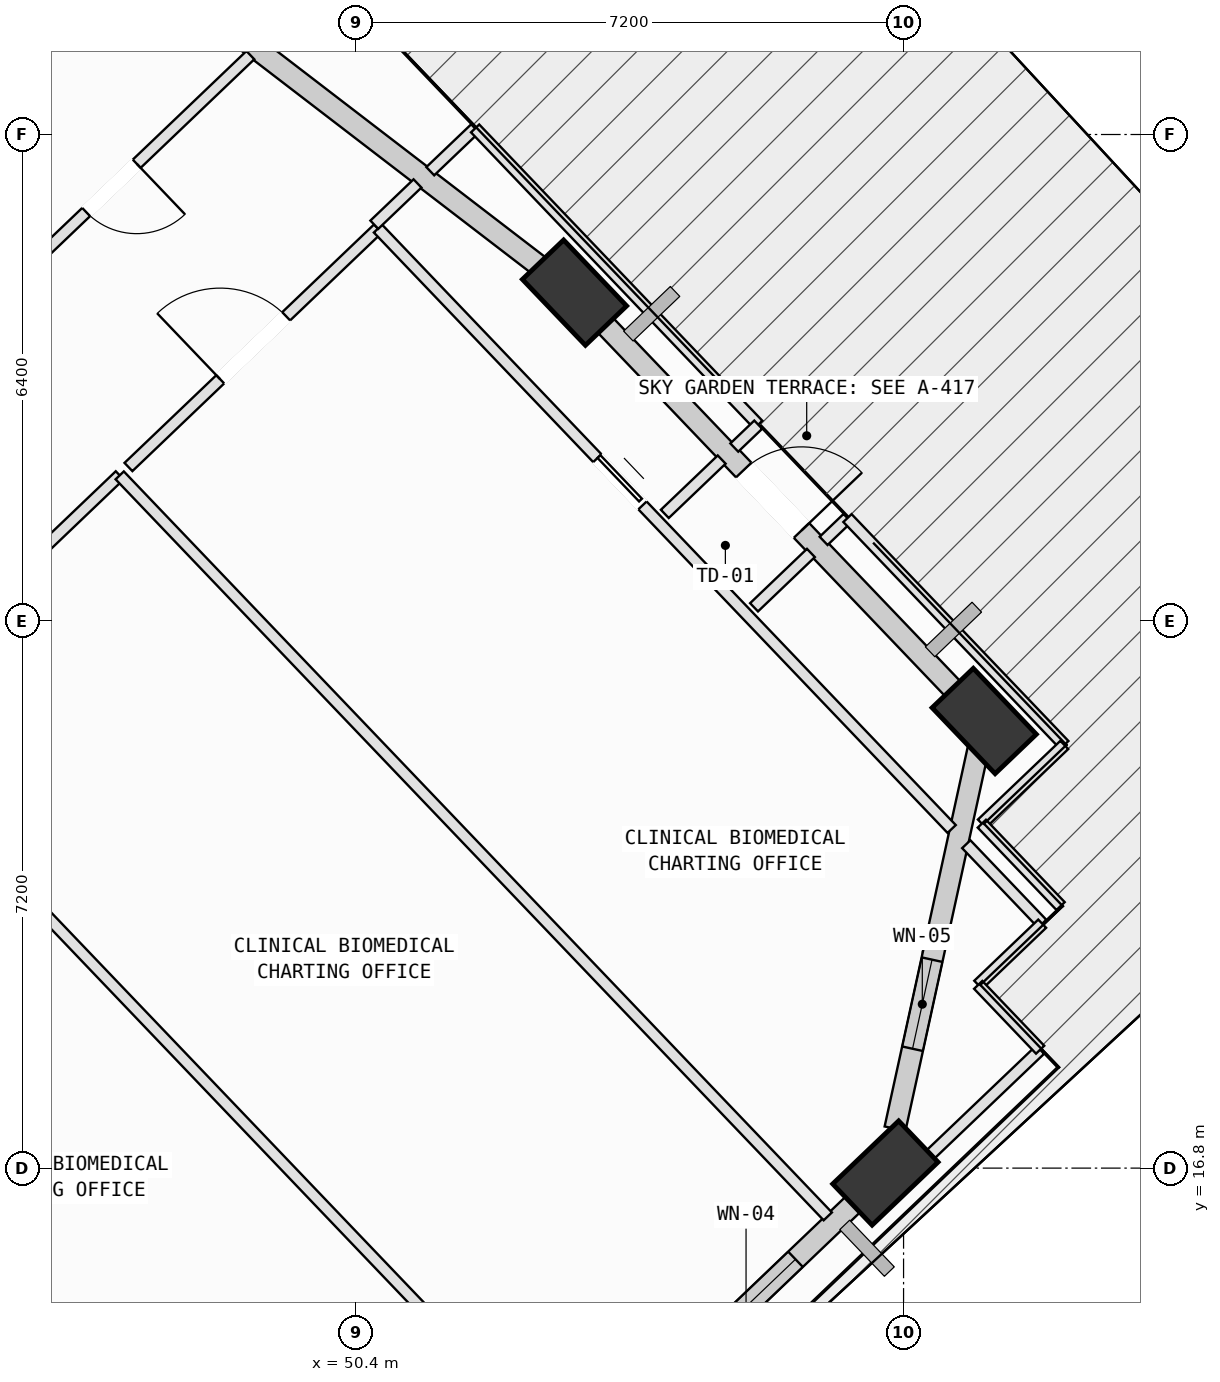
"""IFC4 building model, lengths in metres.
Left out: names, types, materials, properties, quantities, classifications, styles, units other than length and angle.
Written with IfcOpenShell. Run it as: python <this file> out.ifc"""

import sys

from ifc_helpers import new_model, si_unit, direction, frame, frame_2d, origin, origin_2d, place, context, subcontext, project, spatial, rectangle, extrude, element, fill, save


model = new_model("IFC4")
c1 = context("Model", 3, precision=1e-05, world=origin(), true_north=direction((0.0, 1.0)))
c2 = subcontext(c1, "Body", "Model", "MODEL_VIEW")
j1 = project(units=[si_unit("LENGTHUNIT", "METRE"), si_unit("PLANEANGLEUNIT", "RADIAN")], contexts=[c1])
p1 = place(None, origin())
s1 = spatial("IfcSite", under=j1, at=p1, CompositionType="ELEMENT")
p2 = place(p1, origin())
s2 = spatial("IfcBuilding", under=s1, at=p2, CompositionType="ELEMENT")
p3 = place(p2, frame((0.0, 0.0, 211.2)))
s3 = spatial("IfcBuildingStorey", under=s2, at=p3, CompositionType="ELEMENT", Elevation=211.2)
p4 = place(p3, frame((57.361, 16.735, 0.073), z_axis=(0.032482055305, 0.098250483475, 0.994631468726), x_axis=(-0.902127024393, -0.425506275001, 0.071492949273)))
e1 = element("IfcColumn", 1, at=p4, inside=s3, PredefinedType="COLUMN", context=c2, shape_type="SweptSolid", body=[
    extrude(rectangle(XDim=1.2, YDim=0.75, at=origin_2d()), origin(), (0.0, 0.0, 1.0), 3.946),
])
p5 = place(p3, frame((58.661, 22.683, 0.074), z_axis=(0.007921264253, 0.103347744549, 0.994613742751), x_axis=(0.633908539185, -0.769769143243, 0.074936173233)))
e2 = element("IfcColumn", 2, at=p5, inside=s3, PredefinedType="COLUMN", context=c2, shape_type="SweptSolid", body=[
    extrude(rectangle(XDim=1.2, YDim=0.75, at=origin_2d()), origin(), (0.0, 0.0, 1.0), 3.945),
])
p6 = place(p3, frame((53.271, 28.319, 0.06), z_axis=(-0.015197179354, 0.081113400375, 0.996589013596), x_axis=(0.811749063081, -0.580950790477, 0.059662698823)))
e3 = element("IfcColumn", 3, at=p6, inside=s3, PredefinedType="COLUMN", context=c2, shape_type="SweptSolid", body=[
    extrude(rectangle(XDim=1.2, YDim=0.75, at=origin_2d()), origin(), (0.0, 0.0, 1.0), 3.952),
])
p7 = place(p3, frame((57.213, 16.589, 0.0), z_axis=(0.0, 0.0, 1.0), x_axis=(-0.722958179975, -0.69089179327, 0.0)))
e4 = element("IfcWall", 4, at=p7, inside=s3, PredefinedType="SOLIDWALL", context=c2, shape_type="SweptSolid", body=[
    extrude(rectangle(XDim=6.418, YDim=0.28, at=frame_2d((3.209, 0.0))), origin(), (0.0, 0.0, 1.0), 3.265),
])
p8 = place(p7, frame((1.431, 0.0, 0.75)))
e5 = element("IfcOpeningElement", 5, at=p8, cuts=e4, PredefinedType="OPENING", context=c2, shape_type="SweptSolid", body=[
    extrude(rectangle(XDim=1.8, YDim=2.05, at=frame_2d((0.9, 1.025))), frame((0.0, 0.15, 0.0), z_axis=(0.0, -1.0, 0.0), x_axis=(1.0, 0.0, 0.0)), (0.0, 0.0, 1.0), 0.3),
])
p9 = place(p3, frame((58.62, 22.49, 0.0), z_axis=(0.0, 0.0, 1.0), x_axis=(-0.213848166645, -0.976866910906, 0.0)))
e6 = element("IfcWall", 6, at=p9, inside=s3, PredefinedType="SOLIDWALL", context=c2, shape_type="SweptSolid", body=[
    extrude(rectangle(XDim=5.294, YDim=0.28, at=frame_2d((2.647, 0.0))), origin(), (0.0, 0.0, 1.0), 3.265),
])
p10 = place(p9, frame((3.017, 0.0, 0.75)))
e7 = element("IfcOpeningElement", 7, at=p10, cuts=e6, PredefinedType="OPENING", context=c2, shape_type="SweptSolid", body=[
    extrude(rectangle(XDim=1.2, YDim=1.75, at=frame_2d((0.6, 0.875))), frame((0.0, 0.15, 0.0), z_axis=(0.0, -1.0, 0.0), x_axis=(1.0, 0.0, 0.0)), (0.0, 0.0, 1.0), 0.3),
])
p11 = place(p3, frame((53.443, 28.135, 0.0), z_axis=(0.0, 0.0, 1.0), x_axis=(0.690865418221, -0.722983384253, 0.0)))
e8 = element("IfcWall", 8, at=p11, inside=s3, PredefinedType="SOLIDWALL", context=c2, shape_type="SweptSolid", body=[
    extrude(rectangle(XDim=7.046, YDim=0.28, at=frame_2d((3.523, 0.0))), origin(), (0.0, 0.0, 1.0), 3.265),
])
p12 = place(p11, frame((2.973, 0.0, 0.0)))
e9 = element("IfcOpeningElement", 9, at=p12, cuts=e8, PredefinedType="OPENING", context=c2, shape_type="SweptSolid", body=[
    extrude(rectangle(XDim=1.1, YDim=2.15, at=frame_2d((0.55, 1.075))), frame((0.0, 0.15, 0.0), z_axis=(0.0, -1.0, 0.0), x_axis=(1.0, 0.0, 0.0)), (0.0, 0.0, 1.0), 0.3),
])
p13 = place(p3, frame((45.703, 34.124, 0.0), z_axis=(0.0, 0.0, 1.0), x_axis=(0.793258339764, -0.608885216108, 0.0)))
e10 = element("IfcWall", 10, at=p13, inside=s3, PredefinedType="SOLIDWALL", context=c2, shape_type="SweptSolid", body=[
    extrude(rectangle(XDim=9.036, YDim=0.28, at=frame_2d((4.518, 0.0))), origin(), (0.0, 0.0, 1.0), 3.265),
])
p14 = place(p13, frame((1.479, 0.0, 0.75)))
e11 = element("IfcOpeningElement", 11, at=p14, cuts=e10, PredefinedType="OPENING", context=c2, shape_type="SweptSolid", body=[
    extrude(rectangle(XDim=2.0, YDim=1.95, at=frame_2d((1.0, 0.975))), frame((0.0, 0.15, 0.0), z_axis=(0.0, -1.0, 0.0), x_axis=(1.0, 0.0, 0.0)), (0.0, 0.0, 1.0), 0.3),
])
p15 = place(p3, frame((37.093, 16.173, 0.0), z_axis=(0.0, 0.0, 1.0), x_axis=(0.690902774349, -0.722947685795, 0.0)))
e12 = element("IfcWall", 12, at=p15, inside=s3, PredefinedType="PARTITIONING", context=c2, shape_type="SweptSolid", body=[
    extrude(rectangle(XDim=13.485, YDim=0.15, at=frame_2d((6.743, 0.0))), origin(), (0.0, 0.0, 1.0), 3.78),
])
p16 = place(p15, frame((6.312, 0.0, 0.0)))
e13 = element("IfcOpeningElement", 13, at=p16, cuts=e12, PredefinedType="OPENING", context=c2, shape_type="SweptSolid", body=[
    extrude(rectangle(XDim=0.86, YDim=2.06, at=frame_2d((0.43, 1.03))), frame((0.0, 0.085, 0.0), z_axis=(0.0, -1.0, 0.0), x_axis=(1.0, 0.0, 0.0)), (0.0, 0.0, 1.0), 0.17),
])
p17 = place(p3, frame((41.23, 18.647, 0.0), z_axis=(0.0, 0.0, 1.0), x_axis=(0.690901109008, -0.722949277316, 0.0)))
e14 = element("IfcWall", 14, at=p17, inside=s3, PredefinedType="PARTITIONING", context=c2, shape_type="SweptSolid", body=[
    extrude(rectangle(XDim=12.76, YDim=0.15, at=frame_2d((6.38, 0.0))), origin(), (0.0, 0.0, 1.0), 3.78),
])
p18 = place(p3, frame((43.889, 22.667, 0.0), z_axis=(0.0, 0.0, 1.0), x_axis=(0.690910559681, -0.722940245471, 0.0)))
e15 = element("IfcWall", 15, at=p18, inside=s3, PredefinedType="PARTITIONING", context=c2, shape_type="SweptSolid", body=[
    extrude(rectangle(XDim=13.484, YDim=0.15, at=frame_2d((6.742, 0.0))), origin(), (0.0, 0.0, 1.0), 3.415),
])
p19 = place(p3, frame((44.004, 22.778, 0.0), z_axis=(0.0, 0.0, 1.0), x_axis=(0.723025899483, 0.69082092374, 0.0)))
e16 = element("IfcWall", 16, at=p19, inside=s3, PredefinedType="PARTITIONING", context=c2, shape_type="SweptSolid", body=[
    extrude(rectangle(XDim=4.541, YDim=0.15, at=frame_2d((2.271, 0.0))), origin(), (0.0, 0.0, 1.0), 2.765),
])
p20 = place(p19, frame((1.67, 0.0, 0.0)))
e17 = element("IfcOpeningElement", 17, at=p20, cuts=e16, PredefinedType="OPENING", context=c2, shape_type="SweptSolid", body=[
    extrude(rectangle(XDim=1.2, YDim=2.15, at=frame_2d((0.6, 1.075))), frame((0.0, 0.085, 0.0), z_axis=(0.0, -1.0, 0.0), x_axis=(1.0, 0.0, 0.0)), (0.0, 0.0, 1.0), 0.17),
])
p21 = place(p3, frame((47.287, 25.915, 0.0), z_axis=(0.0, 0.0, 1.0), x_axis=(0.690828749695, -0.72301842203, 0.0)))
e18 = element("IfcWall", 18, at=p21, inside=s3, PredefinedType="PARTITIONING", context=c2, shape_type="SweptSolid", body=[
    extrude(rectangle(XDim=13.485, YDim=0.15, at=frame_2d((6.743, 0.0))), origin(), (0.0, 0.0, 1.0), 3.78),
])
p22 = place(p3, frame((59.397, 18.358, 0.0), z_axis=(0.0, 0.0, 1.0), x_axis=(-0.723173492575, -0.690666417047, 0.0)))
e19 = element("IfcWall", 19, at=p22, inside=s3, PredefinedType="PARTITIONING", context=c2, shape_type="SweptSolid", body=[
    extrude(rectangle(XDim=2.801, YDim=0.15, at=frame_2d((1.401, 0.0))), origin(), (0.0, 0.0, 1.0), 3.265),
])
p23 = place(p3, frame((47.402, 26.025, 0.0), z_axis=(0.0, 0.0, 1.0), x_axis=(0.722973384646, 0.690875882553, 0.0)))
e20 = element("IfcWall", 20, at=p23, inside=s3, PredefinedType="PARTITIONING", context=c2, shape_type="SweptSolid", body=[
    extrude(rectangle(XDim=4.541, YDim=0.15, at=frame_2d((2.271, 0.0))), origin(), (0.0, 0.0, 1.0), 3.78),
])
p24 = place(p23, frame((1.67, 0.0, 0.0)))
e21 = element("IfcOpeningElement", 21, at=p24, cuts=e20, PredefinedType="OPENING", context=c2, shape_type="SweptSolid", body=[
    extrude(rectangle(XDim=1.2, YDim=2.15, at=frame_2d((0.6, 1.075))), frame((0.0, 0.085, 0.0), z_axis=(0.0, -1.0, 0.0), x_axis=(1.0, 0.0, 0.0)), (0.0, 0.0, 1.0), 0.17),
])
p25 = place(p3, frame((50.685, 29.162, 0.0), z_axis=(0.0, 0.0, 1.0), x_axis=(0.690801446866, -0.723044508317, 0.0)))
e22 = element("IfcWall", 22, at=p25, inside=s3, PredefinedType="PARTITIONING", context=c2, shape_type="SweptSolid", body=[
    extrude(rectangle(XDim=10.926, YDim=0.15, at=frame_2d((5.463, 0.0))), origin(), (0.0, 0.0, 1.0), 3.78),
])
p26 = place(p25, frame((4.177, 0.0, 0.0)))
e23 = element("IfcOpeningElement", 23, at=p26, cuts=e22, PredefinedType="OPENING", context=c2, shape_type="SweptSolid", body=[
    extrude(rectangle(XDim=0.86, YDim=2.06, at=frame_2d((0.43, 1.03))), frame((0.0, 0.085, 0.0), z_axis=(0.0, -1.0, 0.0), x_axis=(1.0, 0.0, 0.0)), (0.0, 0.0, 1.0), 0.17),
])
p27 = place(p3, frame((58.425, 21.062, 0.0), z_axis=(0.0, 0.0, 1.0), x_axis=(0.690716586023, -0.723125575397, 0.0)))
e24 = element("IfcWall", 24, at=p27, inside=s3, PredefinedType="PARTITIONING", context=c2, shape_type="SweptSolid", body=[
    extrude(rectangle(XDim=1.446, YDim=0.15, at=frame_2d((0.723, 0.0))), origin(), (0.0, 0.0, 1.0), 3.78),
])
p28 = place(p3, frame((59.424, 20.016, 0.0), z_axis=(0.0, 0.0, 1.0), x_axis=(-0.722751072616, -0.691108448098, 0.0)))
e25 = element("IfcWall", 25, at=p28, inside=s3, PredefinedType="PARTITIONING", context=c2, shape_type="SweptSolid", body=[
    extrude(rectangle(XDim=1.165, YDim=0.15, at=frame_2d((0.583, 0.0))), origin(), (0.0, 0.0, 1.0), 3.78),
])
p29 = place(p3, frame((58.582, 19.211, 0.0), z_axis=(0.0, 0.0, 1.0), x_axis=(0.690780844527, -0.723064191365, 0.0)))
e26 = element("IfcWall", 26, at=p29, inside=s3, PredefinedType="PARTITIONING", context=c2, shape_type="SweptSolid", body=[
    extrude(rectangle(XDim=1.18, YDim=0.15, at=frame_2d((0.59, 0.0))), origin(), (0.0, 0.0, 1.0), 3.78),
])
p30 = place(p3, frame((49.006, 31.444, 0.0), z_axis=(0.0, 0.0, 1.0), x_axis=(-0.723025524687, -0.690821316008, 0.0)))
e27 = element("IfcWall", 27, at=p30, inside=s3, PredefinedType="PARTITIONING", context=c2, shape_type="SweptSolid", body=[
    extrude(rectangle(XDim=5.057, YDim=0.15, at=frame_2d((2.528, 0.0))), origin(), (0.0, 0.0, 1.0), 3.78),
])
p31 = place(p30, frame((2.068, 0.0, 0.0)))
e28 = element("IfcOpeningElement", 28, at=p31, cuts=e27, PredefinedType="OPENING", context=c2, shape_type="SweptSolid", body=[
    extrude(rectangle(XDim=0.92, YDim=2.1, at=frame_2d((0.46, 1.05))), frame((0.0, 0.085, 0.0), z_axis=(0.0, -1.0, 0.0), x_axis=(1.0, 0.0, 0.0)), (0.0, 0.0, 1.0), 0.17),
])
p32 = place(p3, frame((50.637, 29.213, 0.0), z_axis=(0.0, 0.0, 1.0), x_axis=(0.722770010061, 0.691088643053, 0.0)))
e29 = element("IfcWall", 29, at=p32, inside=s3, PredefinedType="PARTITIONING", context=c2, shape_type="SweptSolid", body=[
    extrude(rectangle(XDim=0.786, YDim=0.15, at=frame_2d((0.393, 0.0))), origin(), (0.0, 0.0, 1.0), 3.78),
])
p33 = place(p3, frame((51.373, 29.917, 0.0), z_axis=(0.0, 0.0, 1.0), x_axis=(0.723382733555, 0.690447261414, 0.0)))
e30 = element("IfcWall", 30, at=p33, inside=s3, PredefinedType="PARTITIONING", context=c2, shape_type="SweptSolid", body=[
    extrude(rectangle(XDim=0.815, YDim=0.15, at=frame_2d((0.408, 0.0))), origin(), (0.0, 0.0, 1.0), 3.78),
])
p34 = place(p3, frame((51.963, 30.48, 0.0), z_axis=(0.0, 0.0, 1.0), x_axis=(0.690895641029, -0.722954502862, 0.0)))
e31 = element("IfcWall", 31, at=p34, inside=s3, PredefinedType="PARTITIONING", context=c2, shape_type="SweptSolid", body=[
    extrude(rectangle(XDim=5.392, YDim=0.15, at=frame_2d((2.696, 0.0))), origin(), (0.0, 0.0, 1.0), 3.265),
])
p35 = place(p3, frame((55.688, 26.582, 0.0), z_axis=(0.0, 0.0, 1.0), x_axis=(-0.7228973834, -0.690955405994, 0.0)))
e32 = element("IfcWall", 32, at=p35, inside=s3, PredefinedType="PARTITIONING", context=c2, shape_type="SweptSolid", body=[
    extrude(rectangle(XDim=0.436, YDim=0.15, at=frame_2d((0.218, 0.0))), origin(), (0.0, 0.0, 1.0), 3.78),
])
for number, where, z_axis, x_axis in (
    (33, (55.207, 26.123, 0.0), (0.0, 0.0, 1.0), (-0.723, -0.691, 0.0)),
    (34, (55.633, 24.179, 0.0), (0.0, 0.0, 1.0), (0.723, 0.691, 0.0)),
):
    element("IfcWall", number, at=place(p3, frame(where, z_axis=z_axis, x_axis=x_axis)), inside=s3, PredefinedType="PARTITIONING", context=c2, shape_type="SweptSolid", body=[
        extrude(rectangle(XDim=1.035, YDim=0.15, at=frame_2d((0.518, 0.0))), origin(), (0.0, 0.0, 1.0), 3.78),
    ])
p36 = place(p3, frame((56.548, 25.053, 0.0), z_axis=(0.0, 0.0, 1.0), x_axis=(0.722947010739, 0.690903480714, 0.0)))
e35 = element("IfcWall", 35, at=p36, inside=s3, PredefinedType="PARTITIONING", context=c2, shape_type="SweptSolid", body=[
    extrude(rectangle(XDim=0.434, YDim=0.15, at=frame_2d((0.217, 0.0))), origin(), (0.0, 0.0, 1.0), 3.78),
])
p37 = place(p3, frame((56.862, 25.353, 0.0), z_axis=(0.0, 0.0, 1.0), x_axis=(0.690932627738, -0.722919154489, 0.0)))
e36 = element("IfcWall", 36, at=p37, inside=s3, PredefinedType="PARTITIONING", context=c2, shape_type="SweptSolid", body=[
    extrude(rectangle(XDim=4.129, YDim=0.15, at=frame_2d((2.064, 0.0))), origin(), (0.0, 0.0, 1.0), 3.265),
])
p38 = place(p3, frame((59.715, 22.368, 0.0), z_axis=(0.0, 0.0, 1.0), x_axis=(-0.723351849636, -0.690479617099, 0.0)))
e37 = element("IfcWall", 37, at=p38, inside=s3, PredefinedType="PARTITIONING", context=c2, shape_type="SweptSolid", body=[
    extrude(rectangle(XDim=1.5, YDim=0.15, at=frame_2d((0.75, 0.0))), origin(), (0.0, 0.0, 1.0), 3.78),
])
p39 = place(p3, frame((58.63, 21.332, 0.0), z_axis=(0.0, 0.0, 1.0), x_axis=(0.690971235046, -0.722882253441, 0.0)))
e38 = element("IfcWall", 38, at=p39, inside=s3, PredefinedType="PARTITIONING", context=c2, shape_type="SweptSolid", body=[
    extrude(rectangle(XDim=1.5, YDim=0.15, at=frame_2d((0.75, 0.0))), origin(), (0.0, 0.0, 1.0), 3.78),
])
p40 = place(p12, origin())
e39 = element("IfcDoor", 39, at=p40, inside=s3, OperationType="SINGLE_SWING_RIGHT", PredefinedType="DOOR", context=c2, shape_type="SweptSolid", body=[
    extrude(rectangle(XDim=1.1, YDim=2.15, at=frame_2d((0.55, 1.075))), frame((0.0, 0.025, 0.0), z_axis=(0.0, -1.0, 0.0), x_axis=(1.0, 0.0, 0.0)), (0.0, 0.0, 1.0), 0.05),
])
fill(e9, e39)
p41 = place(p8, origin())
e40 = element("IfcWindow", 40, at=p41, inside=s3, PartitioningType="SINGLE_PANEL", PredefinedType="WINDOW", context=c2, shape_type="SweptSolid", body=[
    extrude(rectangle(XDim=1.8, YDim=2.05, at=frame_2d((0.9, 1.025))), frame((0.0, 0.03, 0.0), z_axis=(0.0, -1.0, 0.0), x_axis=(1.0, 0.0, 0.0)), (0.0, 0.0, 1.0), 0.06),
])
fill(e5, e40)
p42 = place(p10, origin())
e41 = element("IfcWindow", 41, at=p42, inside=s3, PartitioningType="SINGLE_PANEL", PredefinedType="WINDOW", context=c2, shape_type="SweptSolid", body=[
    extrude(rectangle(XDim=1.2, YDim=1.75, at=frame_2d((0.6, 0.875))), frame((0.0, 0.03, 0.0), z_axis=(0.0, -1.0, 0.0), x_axis=(1.0, 0.0, 0.0)), (0.0, 0.0, 1.0), 0.06),
])
fill(e7, e41)
p43 = place(p24, origin())
e42 = element("IfcDoor", 42, at=p43, inside=s3, OperationType="SINGLE_SWING_LEFT", PredefinedType="DOOR", context=c2, shape_type="SweptSolid", body=[
    extrude(rectangle(XDim=1.2, YDim=2.15, at=frame_2d((0.6, 1.075))), frame((0.0, 0.025, 0.0), z_axis=(0.0, -1.0, 0.0), x_axis=(1.0, 0.0, 0.0)), (0.0, 0.0, 1.0), 0.05),
])
fill(e21, e42)
p44 = place(p31, origin())
e43 = element("IfcDoor", 43, at=p44, inside=s3, OperationType="SINGLE_SWING_LEFT", PredefinedType="DOOR", context=c2, shape_type="SweptSolid", body=[
    extrude(rectangle(XDim=0.92, YDim=2.1, at=frame_2d((0.46, 1.05))), frame((0.0, 0.025, 0.0), z_axis=(0.0, -1.0, 0.0), x_axis=(1.0, 0.0, 0.0)), (0.0, 0.0, 1.0), 0.05),
])
fill(e28, e43)
p45 = place(p26, origin())
e44 = element("IfcDoor", 44, at=p45, inside=s3, OperationType="SLIDING_TO_LEFT", PredefinedType="DOOR", context=c2, shape_type="SweptSolid", body=[
    extrude(rectangle(XDim=0.86, YDim=2.06, at=frame_2d((0.43, 1.03))), frame((0.0, 0.025, 0.0), z_axis=(0.0, -1.0, 0.0), x_axis=(1.0, 0.0, 0.0)), (0.0, 0.0, 1.0), 0.05),
])
fill(e23, e44)
save(model, sys.argv[1])
